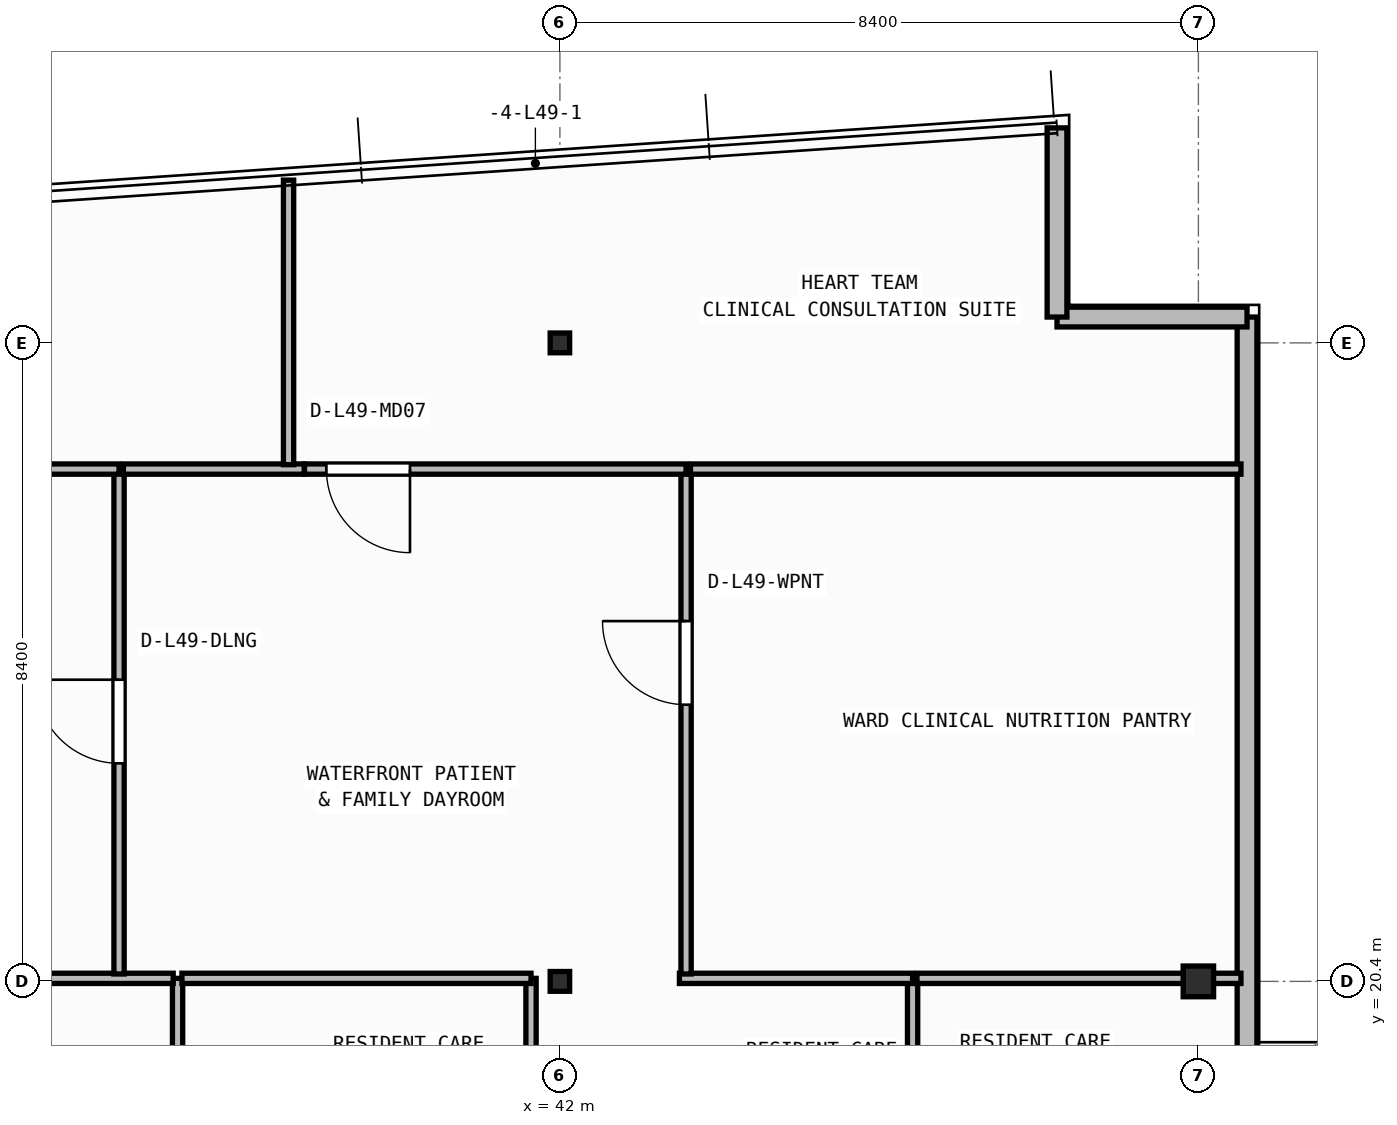
"""IFC4 building model, lengths in metres.
Left out: names, types, materials, properties, quantities, classifications, styles, units other than length and angle.
Written with IfcOpenShell. Run it as: python <this file> out.ifc"""

import sys

from ifc_helpers import new_model, si_unit, direction, frame, frame_2d, origin, origin_2d, place, context, subcontext, project, spatial, rectangle, i_section, extrude, element, fill, save


model = new_model("IFC4")
c1 = context("Model", 3, precision=1e-05, world=origin(), true_north=direction((0.0, 1.0)))
c2 = subcontext(c1, "Body", "Model", "MODEL_VIEW")
j1 = project(units=[si_unit("LENGTHUNIT", "METRE"), si_unit("PLANEANGLEUNIT", "RADIAN")], contexts=[c1])
p1 = place(None, origin())
s1 = spatial("IfcSite", under=j1, at=p1, CompositionType="ELEMENT")
p2 = place(p1, origin())
s2 = spatial("IfcBuilding", under=s1, at=p2, CompositionType="ELEMENT")
p3 = place(p2, frame((0.0, 0.0, 200.0)))
s3 = spatial("IfcBuildingStorey", under=s2, at=p3, CompositionType="ELEMENT", Elevation=200.0)
p4 = place(p3, frame((42.0, 20.4, 0.0), z_axis=(0.0, 0.0, 1.0), x_axis=(1.0, 0.0, 0.0)))
e1 = element("IfcColumn", 1, at=p4, inside=s3, PredefinedType="COLUMN", context=c2, shape_type="SweptSolid", body=[
    extrude(i_section(OverallWidth=0.256, OverallDepth=0.26, WebThickness=0.01, FlangeThickness=0.017, FilletRadius=0.013, at=origin_2d()), origin(), (0.0, 0.0, 1.0), 3.95),
])
p5 = place(p3, frame((50.4, 20.4, 0.0), z_axis=(0.0, 0.0, 1.0), x_axis=(1.0, 0.0, 0.0)))
e2 = element("IfcColumn", 2, at=p5, inside=s3, PredefinedType="COLUMN", context=c2, shape_type="SweptSolid", body=[
    extrude(i_section(OverallWidth=0.4, OverallDepth=0.404, WebThickness=0.02, FlangeThickness=0.032, at=origin_2d()), origin(), (0.0, 0.0, 1.0), 3.95),
])
p6 = place(p3, frame((42.0, 28.8, 0.0), z_axis=(0.0, 0.0, 1.0), x_axis=(1.0, 0.0, 0.0)))
e3 = element("IfcColumn", 3, at=p6, inside=s3, PredefinedType="COLUMN", context=c2, shape_type="SweptSolid", body=[
    extrude(i_section(OverallWidth=0.256, OverallDepth=0.26, WebThickness=0.01, FlangeThickness=0.017, FilletRadius=0.013, at=origin_2d()), origin(), (0.0, 0.0, 1.0), 3.95),
])
p7 = place(p3, frame((51.04, 6.46, 0.0), z_axis=(0.0, 0.0, 1.0), x_axis=(0.0, 1.0, 0.0)))
e4 = element("IfcWall", 4, at=p7, inside=s3, PredefinedType="STANDARD", context=c2, shape_type="SweptSolid", body=[
    extrude(rectangle(XDim=22.68, YDim=0.26, at=frame_2d((11.34, 0.0))), origin(), (0.0, 0.0, 1.0), 3.71),
])
p8 = place(p7, frame((10.69, 0.0, 0.0)))
e5 = element("IfcOpeningElement", 5, at=p8, cuts=e4, PredefinedType="OPENING", context=c2, shape_type="SweptSolid", body=[
    extrude(rectangle(XDim=1.3, YDim=2.15, at=frame_2d((0.65, 1.075))), frame((0.0, 0.14, 0.0), z_axis=(0.0, -1.0, 0.0), x_axis=(1.0, 0.0, 0.0)), (0.0, 0.0, 1.0), 0.28),
])
p9 = place(p3, frame((51.04, 29.14, 0.0), z_axis=(0.0, 0.0, 1.0), x_axis=(-1.0, 0.0, 0.0)))
e6 = element("IfcWall", 6, at=p9, inside=s3, PredefinedType="STANDARD", context=c2, shape_type="SweptSolid", body=[
    extrude(rectangle(XDim=2.5, YDim=0.26, at=frame_2d((1.25, 0.0))), origin(), (0.0, 0.0, 1.0), 3.71),
])
p10 = place(p3, frame((48.54, 29.14, 0.0), z_axis=(0.0, 0.0, 1.0), x_axis=(0.0, 1.0, 0.0)))
e7 = element("IfcWall", 7, at=p10, inside=s3, PredefinedType="STANDARD", context=c2, shape_type="SweptSolid", body=[
    extrude(rectangle(XDim=2.489, YDim=0.26, at=frame_2d((1.245, 0.0))), origin(), (0.0, 0.0, 1.0), 3.71),
])
p11 = place(p3, frame((36.97, 17.833, 0.0), z_axis=(0.0, 0.0, 1.0), x_axis=(0.0, 1.0, 0.0)))
e8 = element("IfcWall", 8, at=p11, inside=s3, PredefinedType="PARTITIONING", context=c2, shape_type="SweptSolid", body=[
    extrude(rectangle(XDim=2.607, YDim=0.135, at=frame_2d((1.304, 0.0))), origin(), (0.0, 0.0, 1.0), 3.71),
])
p12 = place(p3, frame((36.913, 20.44, 0.0), z_axis=(0.0, 0.0, 1.0), x_axis=(-1.0, 0.0, 0.0)))
e9 = element("IfcWall", 9, at=p12, inside=s3, PredefinedType="PARTITIONING", context=c2, shape_type="SweptSolid", body=[
    extrude(rectangle(XDim=4.165, YDim=0.135, at=frame_2d((2.083, 0.0))), origin(), (0.0, 0.0, 1.0), 3.152),
])
p13 = place(p3, frame((41.62, 17.833, 0.0), z_axis=(0.0, 0.0, 1.0), x_axis=(0.0, 1.0, 0.0)))
e10 = element("IfcWall", 10, at=p13, inside=s3, PredefinedType="PARTITIONING", context=c2, shape_type="SweptSolid", body=[
    extrude(rectangle(XDim=2.607, YDim=0.135, at=frame_2d((1.304, 0.0))), origin(), (0.0, 0.0, 1.0), 3.157),
])
p14 = place(p3, frame((41.62, 20.44, 0.0), z_axis=(0.0, 0.0, 1.0), x_axis=(-1.0, 0.0, 0.0)))
e11 = element("IfcWall", 11, at=p14, inside=s3, PredefinedType="PARTITIONING", context=c2, shape_type="SweptSolid", body=[
    extrude(rectangle(XDim=4.593, YDim=0.135, at=frame_2d((2.296, 0.0))), origin(), (0.0, 0.0, 1.0), 3.152),
])
p15 = place(p3, frame((46.64, 17.833, 0.0), z_axis=(0.0, 0.0, 1.0), x_axis=(0.0, 1.0, 0.0)))
e12 = element("IfcWall", 12, at=p15, inside=s3, PredefinedType="PARTITIONING", context=c2, shape_type="SweptSolid", body=[
    extrude(rectangle(XDim=2.607, YDim=0.135, at=frame_2d((1.304, 0.0))), origin(), (0.0, 0.0, 1.0), 3.71),
])
p16 = place(p3, frame((46.64, 20.44, 0.0), z_axis=(0.0, 0.0, 1.0), x_axis=(-1.0, 0.0, 0.0)))
e13 = element("IfcWall", 13, at=p16, inside=s3, PredefinedType="PARTITIONING", context=c2, shape_type="SweptSolid", body=[
    extrude(rectangle(XDim=3.067, YDim=0.135, at=frame_2d((1.534, 0.0))), origin(), (0.0, 0.0, 1.0), 3.152),
])
p17 = place(p3, frame((50.96, 20.44, 0.0), z_axis=(0.0, 0.0, 1.0), x_axis=(-1.0, 0.0, 0.0)))
e14 = element("IfcWall", 14, at=p17, inside=s3, PredefinedType="PARTITIONING", context=c2, shape_type="SweptSolid", body=[
    extrude(rectangle(XDim=4.262, YDim=0.135, at=frame_2d((2.131, 0.0))), origin(), (0.0, 0.0, 1.0), 3.152),
])
p18 = place(p3, frame((36.2, 20.498, 0.0), z_axis=(0.0, 0.0, 1.0), x_axis=(0.0, 1.0, 0.0)))
e15 = element("IfcWall", 15, at=p18, inside=s3, PredefinedType="PARTITIONING", context=c2, shape_type="SweptSolid", body=[
    extrude(rectangle(XDim=6.642, YDim=0.135, at=frame_2d((3.321, 0.0))), origin(), (0.0, 0.0, 1.0), 3.71),
])
p19 = place(p18, frame((2.771, 0.0, 0.0)))
e16 = element("IfcOpeningElement", 16, at=p19, cuts=e15, PredefinedType="OPENING", context=c2, shape_type="SweptSolid", body=[
    extrude(rectangle(XDim=1.1, YDim=2.1, at=frame_2d((0.55, 1.05))), frame((0.0, 0.077, 0.0), z_axis=(0.0, -1.0, 0.0), x_axis=(1.0, 0.0, 0.0)), (0.0, 0.0, 1.0), 0.155),
])
p20 = place(p3, frame((36.2, 27.14, 0.0), z_axis=(0.0, 0.0, 1.0), x_axis=(-1.0, 0.0, 0.0)))
e17 = element("IfcWall", 17, at=p20, inside=s3, PredefinedType="PARTITIONING", context=c2, shape_type="SweptSolid", body=[
    extrude(rectangle(XDim=19.68, YDim=0.135, at=frame_2d((9.84, 0.0))), origin(), (0.0, 0.0, 1.0), 3.71),
])
p21 = place(p20, frame((14.744, 0.0, 0.0)))
e18 = element("IfcOpeningElement", 18, at=p21, cuts=e17, PredefinedType="OPENING", context=c2, shape_type="SweptSolid", body=[
    extrude(rectangle(XDim=1.1, YDim=2.1, at=frame_2d((0.55, 1.05))), frame((0.0, 0.077, 0.0), z_axis=(0.0, -1.0, 0.0), x_axis=(1.0, 0.0, 0.0)), (0.0, 0.0, 1.0), 0.155),
])
p22 = place(p3, frame((43.66, 20.498, 0.0), z_axis=(0.0, 0.0, 1.0), x_axis=(0.0, 1.0, 0.0)))
e19 = element("IfcWall", 19, at=p22, inside=s3, PredefinedType="PARTITIONING", context=c2, shape_type="SweptSolid", body=[
    extrude(rectangle(XDim=6.642, YDim=0.135, at=frame_2d((3.321, 0.0))), origin(), (0.0, 0.0, 1.0), 3.71),
])
p23 = place(p22, frame((3.542, 0.0, 0.0)))
e20 = element("IfcOpeningElement", 20, at=p23, cuts=e19, PredefinedType="OPENING", context=c2, shape_type="SweptSolid", body=[
    extrude(rectangle(XDim=1.1, YDim=2.1, at=frame_2d((0.55, 1.05))), frame((0.0, 0.077, 0.0), z_axis=(0.0, -1.0, 0.0), x_axis=(1.0, 0.0, 0.0)), (0.0, 0.0, 1.0), 0.155),
])
p24 = place(p3, frame((38.637, 27.14, 0.0), z_axis=(0.0, 0.0, 1.0), x_axis=(-1.0, 0.0, 0.0)))
e21 = element("IfcWall", 21, at=p24, inside=s3, PredefinedType="PARTITIONING", context=c2, shape_type="SweptSolid", body=[
    extrude(rectangle(XDim=2.38, YDim=0.135, at=frame_2d((1.19, 0.0))), origin(), (0.0, 0.0, 1.0), 3.71),
])
p25 = place(p3, frame((43.66, 27.14, 0.0), z_axis=(0.0, 0.0, 1.0), x_axis=(-1.0, 0.0, 0.0)))
e22 = element("IfcWall", 22, at=p25, inside=s3, PredefinedType="PARTITIONING", context=c2, shape_type="SweptSolid", body=[
    extrude(rectangle(XDim=5.021, YDim=0.135, at=frame_2d((2.51, 0.0))), origin(), (0.0, 0.0, 1.0), 3.71),
])
p26 = place(p25, frame((3.633, 0.0, 0.0)))
e23 = element("IfcOpeningElement", 23, at=p26, cuts=e22, PredefinedType="OPENING", context=c2, shape_type="SweptSolid", body=[
    extrude(rectangle(XDim=1.1, YDim=2.1, at=frame_2d((0.55, 1.05))), frame((0.0, 0.077, 0.0), z_axis=(0.0, -1.0, 0.0), x_axis=(1.0, 0.0, 0.0)), (0.0, 0.0, 1.0), 0.155),
])
p27 = place(p3, frame((50.96, 27.14, 0.0), z_axis=(0.0, 0.0, 1.0), x_axis=(-1.0, 0.0, 0.0)))
e24 = element("IfcWall", 24, at=p27, inside=s3, PredefinedType="PARTITIONING", context=c2, shape_type="SweptSolid", body=[
    extrude(rectangle(XDim=7.242, YDim=0.135, at=frame_2d((3.621, 0.0))), origin(), (0.0, 0.0, 1.0), 3.71),
])
p28 = place(p3, frame((38.43, 27.198, 0.0), z_axis=(0.0, 0.0, 1.0), x_axis=(0.0, 1.0, 0.0)))
e25 = element("IfcWall", 25, at=p28, inside=s3, PredefinedType="PARTITIONING", context=c2, shape_type="SweptSolid", body=[
    extrude(rectangle(XDim=3.744, YDim=0.135, at=frame_2d((1.872, 0.0))), origin(), (0.0, 0.0, 1.0), 3.71),
])
p29 = place(p19, origin())
e26 = element("IfcDoor", 26, at=p29, inside=s3, OperationType="SINGLE_SWING_RIGHT", PredefinedType="DOOR", context=c2, shape_type="SweptSolid", body=[
    extrude(rectangle(XDim=1.1, YDim=2.1, at=frame_2d((0.55, 1.05))), frame((0.0, 0.025, 0.0), z_axis=(0.0, -1.0, 0.0), x_axis=(1.0, 0.0, 0.0)), (0.0, 0.0, 1.0), 0.05),
])
fill(e16, e26)
p30 = place(p23, origin())
e27 = element("IfcDoor", 27, at=p30, inside=s3, OperationType="SINGLE_SWING_RIGHT", PredefinedType="DOOR", context=c2, shape_type="SweptSolid", body=[
    extrude(rectangle(XDim=1.1, YDim=2.1, at=frame_2d((0.55, 1.05))), frame((0.0, 0.025, 0.0), z_axis=(0.0, -1.0, 0.0), x_axis=(1.0, 0.0, 0.0)), (0.0, 0.0, 1.0), 0.05),
])
fill(e20, e27)
p31 = place(p26, origin())
e28 = element("IfcDoor", 28, at=p31, inside=s3, OperationType="SINGLE_SWING_LEFT", PredefinedType="DOOR", context=c2, shape_type="SweptSolid", body=[
    extrude(rectangle(XDim=1.1, YDim=2.1, at=frame_2d((0.55, 1.05))), frame((0.0, 0.025, 0.0), z_axis=(0.0, -1.0, 0.0), x_axis=(1.0, 0.0, 0.0)), (0.0, 0.0, 1.0), 0.05),
])
fill(e23, e28)
save(model, sys.argv[1])
